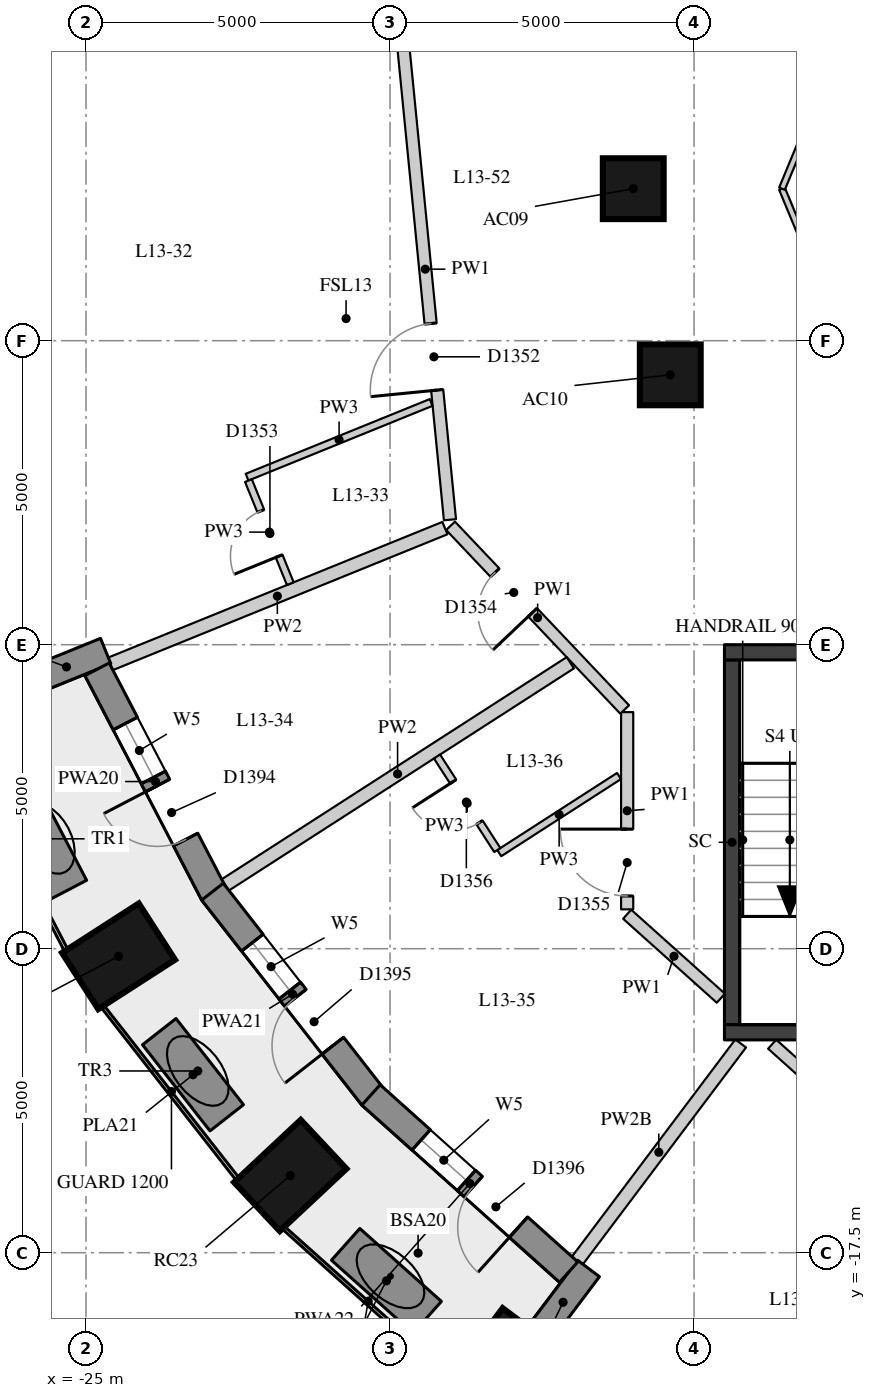
"""IFC4 building model, lengths in metres.
Left out: names, types, materials, properties, quantities, classifications, styles, units other than length and angle.
Written with IfcOpenShell. Run it as: python <this file> out.ifc"""

import sys

from ifc_helpers import new_model, si_unit, direction, frame, frame_2d, origin, origin_2d, place, context, subcontext, project, spatial, rectangle, extrude, element, fill, save


model = new_model("IFC4")
c1 = context("Model", 3, precision=1e-05, world=origin(), true_north=direction((0.0, 1.0)))
c2 = subcontext(c1, "Body", "Model", "MODEL_VIEW")
j1 = project(units=[si_unit("LENGTHUNIT", "METRE"), si_unit("PLANEANGLEUNIT", "RADIAN")], contexts=[c1])
p1 = place(None, origin())
s1 = spatial("IfcSite", under=j1, at=p1, CompositionType="ELEMENT")
p2 = place(p1, origin())
s2 = spatial("IfcBuilding", under=s1, at=p2, CompositionType="ELEMENT")
p3 = place(p2, frame((0.0, 0.0, 51.4)))
s3 = spatial("IfcBuildingStorey", under=s2, at=p3, CompositionType="ELEMENT", Elevation=51.4)
for number, where, z_axis, x_axis in (
    (1, (-24.465, -12.625, 0.0), (0.0, 0.0, 1.0), (-0.841, -0.541, 0.0)),
    (2, (-21.641, -16.23, 0.0), (0.0, 0.0, 1.0), (-0.73, -0.683, 0.0)),
    (3, (-18.159, -19.343, 0.0), (0.0, 0.0, 1.0), (-0.601, -0.799, 0.0)),
):
    element("IfcColumn", number, at=place(p3, frame(where, z_axis=z_axis, x_axis=x_axis)), inside=s3, PredefinedType="COLUMN", context=c2, shape_type="SweptSolid", body=[
        extrude(rectangle(XDim=1.5, YDim=1.1, at=origin_2d()), origin(), (0.0, 0.0, 1.0), 3.3),
    ])
for number, where, z_axis, x_axis in (
    (4, (-16.0, 0.0, 0.0), (0.0, 0.0, 1.0), (1.0, 0.0, 0.0)),
    (5, (-15.391, -3.062, 0.0), (0.0, 0.0, 1.0), (1.0, 0.0, 0.0)),
):
    element("IfcColumn", number, at=place(p3, frame(where, z_axis=z_axis, x_axis=x_axis)), inside=s3, PredefinedType="COLUMN", context=c2, shape_type="SweptSolid", body=[
        extrude(rectangle(XDim=1.0, YDim=1.0, at=origin_2d()), origin(), (0.0, 0.0, 1.0), 3.3),
    ])
p4 = place(p3, frame((-25.965, -8.127, 0.0), z_axis=(0.0, 0.0, 1.0), x_axis=(0.926575599743, 0.376108572039, 0.0)))
e6 = element("IfcWall", 6, at=p4, inside=s3, PredefinedType="SOLIDWALL", context=c2, shape_type="SweptSolid", body=[
    extrude(rectangle(XDim=1.39, YDim=0.45, at=frame_2d((0.695, 0.0))), origin(), (0.0, 0.0, 1.0), 3.02),
])
p5 = place(p3, frame((-17.572, -18.871, 0.0), z_axis=(0.0, 0.0, 1.0), x_axis=(0.601262851241, 0.799051302306, 0.0)))
e7 = element("IfcWall", 7, at=p5, inside=s3, PredefinedType="SOLIDWALL", context=c2, shape_type="SweptSolid", body=[
    extrude(rectangle(XDim=1.391, YDim=0.45, at=frame_2d((0.696, 0.0))), origin(), (0.0, 0.0, 1.0), 2.57),
])
p6 = place(p3, frame((-24.818, -7.905, 0.0), z_axis=(0.0, 0.0, 1.0), x_axis=(0.461517123562, -0.887131300687, 0.0)))
e8 = element("IfcWall", 8, at=p6, inside=s3, PredefinedType="SOLIDWALL", context=c2, shape_type="SweptSolid", body=[
    extrude(rectangle(XDim=4.162, YDim=0.45, at=frame_2d((2.081, 0.0))), origin(), (0.0, 0.0, 1.0), 3.02),
])
p7 = place(p6, frame((1.006, 0.0, 0.4)))
e9 = element("IfcOpeningElement", 9, at=p7, cuts=e8, PredefinedType="OPENING", context=c2, shape_type="SweptSolid", body=[
    extrude(rectangle(XDim=1.0, YDim=1.75, at=frame_2d((0.5, 0.875))), frame((0.0, 0.235, 0.0), z_axis=(0.0, -1.0, 0.0), x_axis=(1.0, 0.0, 0.0)), (0.0, 0.0, 1.0), 0.47),
])
p8 = place(p6, frame((2.156, 0.0, 0.0)))
e10 = element("IfcOpeningElement", 10, at=p8, cuts=e8, PredefinedType="OPENING", context=c2, shape_type="SweptSolid", body=[
    extrude(rectangle(XDim=1.0, YDim=2.15, at=frame_2d((0.5, 1.075))), frame((0.0, 0.235, 0.0), z_axis=(0.0, -1.0, 0.0), x_axis=(1.0, 0.0, 0.0)), (0.0, 0.0, 1.0), 0.47),
])
p9 = place(p3, frame((-22.92, -11.562, 0.0), z_axis=(0.0, 0.0, 1.0), x_axis=(0.615586464456, -0.788069352772, 0.0)))
e11 = element("IfcWall", 11, at=p9, inside=s3, PredefinedType="SOLIDWALL", context=c2, shape_type="SweptSolid", body=[
    extrude(rectangle(XDim=4.279, YDim=0.45, at=frame_2d((2.139, 0.0))), origin(), (0.0, 0.0, 1.0), 3.02),
])
p10 = place(p9, frame((1.064, 0.0, 0.4)))
e12 = element("IfcOpeningElement", 12, at=p10, cuts=e11, PredefinedType="OPENING", context=c2, shape_type="SweptSolid", body=[
    extrude(rectangle(XDim=1.0, YDim=1.75, at=frame_2d((0.5, 0.875))), frame((0.0, 0.235, 0.0), z_axis=(0.0, -1.0, 0.0), x_axis=(1.0, 0.0, 0.0)), (0.0, 0.0, 1.0), 0.47),
])
p11 = place(p9, frame((2.214, 0.0, 0.0)))
e13 = element("IfcOpeningElement", 13, at=p11, cuts=e11, PredefinedType="OPENING", context=c2, shape_type="SweptSolid", body=[
    extrude(rectangle(XDim=1.0, YDim=2.15, at=frame_2d((0.5, 1.075))), frame((0.0, 0.235, 0.0), z_axis=(0.0, -1.0, 0.0), x_axis=(1.0, 0.0, 0.0)), (0.0, 0.0, 1.0), 0.47),
])
p12 = place(p3, frame((-20.313, -14.905, 0.0), z_axis=(0.0, 0.0, 1.0), x_axis=(0.744616407434, -0.667492626012, 0.0)))
e14 = element("IfcWall", 14, at=p12, inside=s3, PredefinedType="SOLIDWALL", context=c2, shape_type="SweptSolid", body=[
    extrude(rectangle(XDim=4.365, YDim=0.45, at=frame_2d((2.183, 0.0))), origin(), (0.0, 0.0, 1.0), 3.02),
])
p13 = place(p12, frame((1.108, 0.0, 0.4)))
e15 = element("IfcOpeningElement", 15, at=p13, cuts=e14, PredefinedType="OPENING", context=c2, shape_type="SweptSolid", body=[
    extrude(rectangle(XDim=1.0, YDim=1.75, at=frame_2d((0.5, 0.875))), frame((0.0, 0.235, 0.0), z_axis=(0.0, -1.0, 0.0), x_axis=(1.0, 0.0, 0.0)), (0.0, 0.0, 1.0), 0.47),
])
p14 = place(p12, frame((2.258, 0.0, 0.0)))
e16 = element("IfcOpeningElement", 16, at=p14, cuts=e14, PredefinedType="OPENING", context=c2, shape_type="SweptSolid", body=[
    extrude(rectangle(XDim=1.0, YDim=2.15, at=frame_2d((0.5, 1.075))), frame((0.0, 0.235, 0.0), z_axis=(0.0, -1.0, 0.0), x_axis=(1.0, 0.0, 0.0)), (0.0, 0.0, 1.0), 0.47),
])
p15 = place(p3, frame((-26.133, -9.941, 0.0), z_axis=(0.0, 0.0, 1.0), x_axis=(0.462501112253, -0.886618701114, 0.0)))
e17 = element("IfcWall", 17, at=p15, inside=s3, PredefinedType="USERDEFINED", context=c2, shape_type="SweptSolid", body=[
    extrude(rectangle(XDim=1.8, YDim=0.7, at=frame_2d((0.9, 0.0))), origin(), (0.0, 0.0, 1.0), 0.75),
])
p16 = place(p3, frame((-23.795, -13.864, 0.0), z_axis=(0.0, 0.0, 1.0), x_axis=(0.616622746332, -0.787258781282, 0.0)))
e18 = element("IfcWall", 18, at=p16, inside=s3, PredefinedType="USERDEFINED", context=c2, shape_type="SweptSolid", body=[
    extrude(rectangle(XDim=1.8, YDim=0.7, at=frame_2d((0.9, 0.0))), origin(), (0.0, 0.0, 1.0), 0.75),
])
p17 = place(p3, frame((-20.73, -17.363, 0.0), z_axis=(0.0, 0.0, 1.0), x_axis=(0.745535653445, -0.666465745139, 0.0)))
e19 = element("IfcWall", 19, at=p17, inside=s3, PredefinedType="USERDEFINED", context=c2, shape_type="SweptSolid", body=[
    extrude(rectangle(XDim=1.8, YDim=0.7, at=frame_2d((0.9, 0.0))), origin(), (0.0, 0.0, 1.0), 0.75),
])
p18 = place(p3, frame((-14.375, -13.75, -0.28), z_axis=(0.0, 0.0, 1.0), x_axis=(0.0, 1.0, 0.0)))
e20 = element("IfcWall", 20, at=p18, inside=s3, PredefinedType="SHEAR", context=c2, shape_type="SweptSolid", body=[
    extrude(rectangle(XDim=6.0, YDim=0.25, at=frame_2d((3.0, 0.0))), origin(), (0.0, 0.0, 1.0), 3.3),
])
for number, where, z_axis, x_axis in (
    (21, (-14.5, -7.625, -0.28), (0.0, 0.0, 1.0), (1.0, 0.0, 0.0)),
    (22, (-14.5, -13.875, -0.28), (0.0, 0.0, 1.0), (1.0, 0.0, 0.0)),
):
    element("IfcWall", number, at=place(p3, frame(where, z_axis=z_axis, x_axis=x_axis)), inside=s3, PredefinedType="SHEAR", context=c2, shape_type="SweptSolid", body=[
        extrude(rectangle(XDim=5.2, YDim=0.25, at=frame_2d((2.6, 0.0))), origin(), (0.0, 0.0, 1.0), 3.3),
    ])
p19 = place(p3, frame((-14.559, -13.314, 0.0), z_axis=(0.0, 0.0, 1.0), x_axis=(-0.744636171002, 0.667470578254, 0.0)))
e23 = element("IfcWall", 23, at=p19, inside=s3, PredefinedType="PARTITIONING", context=c2, shape_type="SweptSolid", body=[
    extrude(rectangle(XDim=2.069, YDim=0.2, at=frame_2d((1.035, 0.0))), origin(), (0.0, 0.0, 1.0), 3.02),
])
p20 = place(p3, frame((-16.1, -11.853, 0.0), z_axis=(0.0, 0.0, 1.0), x_axis=(0.0, 1.0, 0.0)))
e24 = element("IfcWall", 24, at=p20, inside=s3, PredefinedType="PARTITIONING", context=c2, shape_type="SweptSolid", body=[
    extrude(rectangle(XDim=3.244, YDim=0.2, at=frame_2d((1.622, 0.0))), origin(), (0.0, 0.0, 1.0), 3.02),
])
p21 = place(p20, frame((0.22, 0.0, 0.0)))
e25 = element("IfcOpeningElement", 25, at=p21, cuts=e24, PredefinedType="OPENING", context=c2, shape_type="SweptSolid", body=[
    extrude(rectangle(XDim=1.1, YDim=2.1, at=frame_2d((0.55, 1.05))), frame((0.0, 0.11, 0.0), z_axis=(0.0, -1.0, 0.0), x_axis=(1.0, 0.0, 0.0)), (0.0, 0.0, 1.0), 0.22),
])
p22 = place(p3, frame((-16.141, -8.566, 0.0), z_axis=(0.0, 0.0, 1.0), x_axis=(-0.687938220375, 0.725769250483, 0.0)))
e26 = element("IfcWall", 26, at=p22, inside=s3, PredefinedType="PARTITIONING", context=c2, shape_type="SweptSolid", body=[
    extrude(rectangle(XDim=4.162, YDim=0.2, at=frame_2d((2.081, 0.0))), origin(), (0.0, 0.0, 1.0), 3.02),
])
p23 = place(p22, frame((2.201, 0.0, 0.0)))
e27 = element("IfcOpeningElement", 27, at=p23, cuts=e26, PredefinedType="OPENING", context=c2, shape_type="SweptSolid", body=[
    extrude(rectangle(XDim=0.9, YDim=2.1, at=frame_2d((0.45, 1.05))), frame((0.0, 0.11, 0.0), z_axis=(0.0, -1.0, 0.0), x_axis=(1.0, 0.0, 0.0)), (0.0, 0.0, 1.0), 0.22),
])
p24 = place(p3, frame((-19.014, -5.445, 0.0), z_axis=(0.0, 0.0, 1.0), x_axis=(-0.098076369896, 0.995178891289, 0.0)))
e28 = element("IfcWall", 28, at=p24, inside=s3, PredefinedType="PARTITIONING", context=c2, shape_type="SweptSolid", body=[
    extrude(rectangle(XDim=8.282, YDim=0.2, at=frame_2d((4.141, 0.0))), origin(), (0.0, 0.0, 1.0), 3.02),
])
p25 = place(p24, frame((2.142, 0.0, 0.0)))
e29 = element("IfcOpeningElement", 29, at=p25, cuts=e28, PredefinedType="OPENING", context=c2, shape_type="SweptSolid", body=[
    extrude(rectangle(XDim=1.1, YDim=2.1, at=frame_2d((0.55, 1.05))), frame((0.0, 0.11, 0.0), z_axis=(0.0, -1.0, 0.0), x_axis=(1.0, 0.0, 0.0)), (0.0, 0.0, 1.0), 0.22),
])
p26 = place(p3, frame((-12.054, -15.56, 0.0), z_axis=(0.0, 0.0, 1.0), x_axis=(-0.744625700487, 0.66748225907, 0.0)))
e30 = element("IfcWall", 30, at=p26, inside=s3, PredefinedType="PARTITIONING", context=c2, shape_type="SweptSolid", body=[
    extrude(rectangle(XDim=2.231, YDim=0.2, at=frame_2d((1.116, 0.0))), origin(), (0.0, 0.0, 1.0), 3.02),
])
p27 = place(p3, frame((-24.609, -7.82, 0.0), z_axis=(0.0, 0.0, 1.0), x_axis=(0.926562262773, 0.376141427131, 0.0)))
e31 = element("IfcWall", 31, at=p27, inside=s3, PredefinedType="PARTITIONING", context=c2, shape_type="SweptSolid", body=[
    extrude(rectangle(XDim=5.948, YDim=0.22, at=frame_2d((2.974, 0.0))), origin(), (0.0, 0.0, 1.0), 3.02),
])
p28 = place(p3, frame((-22.717, -11.456, 0.0), z_axis=(0.0, 0.0, 1.0), x_axis=(0.840775666807, 0.541383669965, 0.0)))
e32 = element("IfcWall", 32, at=p28, inside=s3, PredefinedType="PARTITIONING", context=c2, shape_type="SweptSolid", body=[
    extrude(rectangle(XDim=6.759, YDim=0.22, at=frame_2d((3.379, 0.0))), origin(), (0.0, 0.0, 1.0), 3.02),
])
p29 = place(p3, frame((-16.927, -17.638, 0.0), z_axis=(0.0, 0.0, 1.0), x_axis=(0.601158965663, 0.799129462605, 0.0)))
e33 = element("IfcWall", 33, at=p29, inside=s3, PredefinedType="PARTITIONING", context=c2, shape_type="SweptSolid", body=[
    extrude(rectangle(XDim=4.48, YDim=0.22, at=frame_2d((2.24, 0.0))), origin(), (0.0, 0.0, 1.0), 2.57),
])
p30 = place(p3, frame((-19.324, -3.516, 0.0), z_axis=(0.0, 0.0, 1.0), x_axis=(-0.926573216048, -0.376114444421, 0.0)))
e34 = element("IfcWall", 34, at=p30, inside=s3, PredefinedType="PARTITIONING", context=c2, shape_type="SweptSolid", body=[
    extrude(rectangle(XDim=3.267, YDim=0.12, at=frame_2d((1.634, 0.0))), origin(), (0.0, 0.0, 1.0), 3.02),
])
p31 = place(p3, frame((-16.234, -9.66, 0.0), z_axis=(0.0, 0.0, 1.0), x_axis=(-0.840731269954, -0.541452612628, 0.0)))
e35 = element("IfcWall", 35, at=p31, inside=s3, PredefinedType="PARTITIONING", context=c2, shape_type="SweptSolid", body=[
    extrude(rectangle(XDim=2.343, YDim=0.12, at=frame_2d((1.171, 0.0))), origin(), (0.0, 0.0, 1.0), 3.02),
])
p32 = place(p3, frame((-22.329, -4.801, 0.0), z_axis=(0.0, 0.0, 1.0), x_axis=(0.376101474088, -0.926578480858, 0.0)))
e36 = element("IfcWall", 36, at=p32, inside=s3, PredefinedType="PARTITIONING", context=c2, shape_type="SweptSolid", body=[
    extrude(rectangle(XDim=1.83, YDim=0.12, at=frame_2d((0.915, 0.0))), origin(), (0.0, 0.0, 1.0), 3.02),
])
p33 = place(p32, frame((0.54, 0.0, 0.0)))
e37 = element("IfcOpeningElement", 37, at=p33, cuts=e36, PredefinedType="OPENING", context=c2, shape_type="SweptSolid", body=[
    extrude(rectangle(XDim=0.8, YDim=2.1, at=frame_2d((0.4, 1.05))), frame((0.0, 0.07, 0.0), z_axis=(0.0, -1.0, 0.0), x_axis=(1.0, 0.0, 0.0)), (0.0, 0.0, 1.0), 0.14),
])
p34 = place(p3, frame((-18.236, -10.878, 0.0), z_axis=(0.0, 0.0, 1.0), x_axis=(-0.54164058606, 0.840610180484, 0.0)))
e38 = element("IfcWall", 38, at=p34, inside=s3, PredefinedType="PARTITIONING", context=c2, shape_type="SweptSolid", body=[
    extrude(rectangle(XDim=1.83, YDim=0.12, at=frame_2d((0.915, 0.0))), origin(), (0.0, 0.0, 1.0), 3.02),
])
p35 = place(p34, frame((0.54, 0.0, 0.0)))
e39 = element("IfcOpeningElement", 39, at=p35, cuts=e38, PredefinedType="OPENING", context=c2, shape_type="SweptSolid", body=[
    extrude(rectangle(XDim=0.8, YDim=2.1, at=frame_2d((0.4, 1.05))), frame((0.0, 0.07, 0.0), z_axis=(0.0, -1.0, 0.0), x_axis=(1.0, 0.0, 0.0)), (0.0, 0.0, 1.0), 0.14),
])
for number, where, z_axis, x_axis in (
    (40, (-11.927, -3.927, 0.0), (0.0, 0.0, 1.0), (-0.383, 0.924, 0.0)),
    (41, (-13.554, 0.0, 0.0), (0.0, 0.0, 1.0), (0.383, 0.924, 0.0)),
):
    element("IfcWall", number, at=place(p3, frame(where, z_axis=z_axis, x_axis=x_axis)), inside=s3, PredefinedType="PARTITIONING", context=c2, shape_type="SweptSolid", body=[
        extrude(rectangle(XDim=4.251, YDim=0.1, at=frame_2d((2.125, 0.0))), origin(), (0.0, 0.0, 1.0), 3.02),
    ])
p36 = place(p7, origin())
e42 = element("IfcWindow", 42, at=p36, inside=s3, PartitioningType="SINGLE_PANEL", PredefinedType="WINDOW", context=c2, shape_type="SweptSolid", body=[
    extrude(rectangle(XDim=1.0, YDim=1.75, at=frame_2d((0.5, 0.875))), frame((0.0, 0.035, 0.0), z_axis=(0.0, -1.0, 0.0), x_axis=(1.0, 0.0, 0.0)), (0.0, 0.0, 1.0), 0.06),
])
fill(e9, e42)
p37 = place(p8, frame((1.0, 0.0, 0.0), z_axis=(0.0, 0.0, 1.0), x_axis=(-1.0, 0.0, 0.0)))
e43 = element("IfcDoor", 43, at=p37, inside=s3, OperationType="SINGLE_SWING_RIGHT", PredefinedType="DOOR", context=c2, shape_type="SweptSolid", body=[
    extrude(rectangle(XDim=1.0, YDim=2.15, at=frame_2d((0.5, 1.075))), frame((0.0, 0.075, 0.0), z_axis=(0.0, -1.0, 0.0), x_axis=(1.0, 0.0, 0.0)), (0.0, 0.0, 1.0), 0.05),
])
fill(e10, e43)
p38 = place(p10, origin())
e44 = element("IfcWindow", 44, at=p38, inside=s3, PartitioningType="SINGLE_PANEL", PredefinedType="WINDOW", context=c2, shape_type="SweptSolid", body=[
    extrude(rectangle(XDim=1.0, YDim=1.75, at=frame_2d((0.5, 0.875))), frame((0.0, 0.035, 0.0), z_axis=(0.0, -1.0, 0.0), x_axis=(1.0, 0.0, 0.0)), (0.0, 0.0, 1.0), 0.06),
])
fill(e12, e44)
p39 = place(p11, frame((1.0, 0.0, 0.0), z_axis=(0.0, 0.0, 1.0), x_axis=(-1.0, 0.0, 0.0)))
e45 = element("IfcDoor", 45, at=p39, inside=s3, OperationType="SINGLE_SWING_LEFT", PredefinedType="DOOR", context=c2, shape_type="SweptSolid", body=[
    extrude(rectangle(XDim=1.0, YDim=2.15, at=frame_2d((0.5, 1.075))), frame((0.0, 0.075, 0.0), z_axis=(0.0, -1.0, 0.0), x_axis=(1.0, 0.0, 0.0)), (0.0, 0.0, 1.0), 0.05),
])
fill(e13, e45)
p40 = place(p13, origin())
e46 = element("IfcWindow", 46, at=p40, inside=s3, PartitioningType="SINGLE_PANEL", PredefinedType="WINDOW", context=c2, shape_type="SweptSolid", body=[
    extrude(rectangle(XDim=1.0, YDim=1.75, at=frame_2d((0.5, 0.875))), frame((0.0, 0.035, 0.0), z_axis=(0.0, -1.0, 0.0), x_axis=(1.0, 0.0, 0.0)), (0.0, 0.0, 1.0), 0.06),
])
fill(e15, e46)
p41 = place(p14, frame((1.0, 0.0, 0.0), z_axis=(0.0, 0.0, 1.0), x_axis=(-1.0, 0.0, 0.0)))
e47 = element("IfcDoor", 47, at=p41, inside=s3, OperationType="SINGLE_SWING_LEFT", PredefinedType="DOOR", context=c2, shape_type="SweptSolid", body=[
    extrude(rectangle(XDim=1.0, YDim=2.15, at=frame_2d((0.5, 1.075))), frame((0.0, 0.075, 0.0), z_axis=(0.0, -1.0, 0.0), x_axis=(1.0, 0.0, 0.0)), (0.0, 0.0, 1.0), 0.05),
])
fill(e16, e47)
p42 = place(p25, origin())
e48 = element("IfcDoor", 48, at=p42, inside=s3, OperationType="SINGLE_SWING_LEFT", PredefinedType="DOOR", context=c2, shape_type="SweptSolid", body=[
    extrude(rectangle(XDim=1.1, YDim=2.1, at=frame_2d((0.55, 1.05))), frame((0.0, 0.025, 0.0), z_axis=(0.0, -1.0, 0.0), x_axis=(1.0, 0.0, 0.0)), (0.0, 0.0, 1.0), 0.05),
])
fill(e29, e48)
p43 = place(p33, origin())
e49 = element("IfcDoor", 49, at=p43, inside=s3, OperationType="SINGLE_SWING_LEFT", PredefinedType="DOOR", context=c2, shape_type="SweptSolid", body=[
    extrude(rectangle(XDim=0.8, YDim=2.1, at=frame_2d((0.4, 1.05))), frame((0.0, 0.025, 0.0), z_axis=(0.0, -1.0, 0.0), x_axis=(1.0, 0.0, 0.0)), (0.0, 0.0, 1.0), 0.05),
])
fill(e37, e49)
p44 = place(p23, origin())
e50 = element("IfcDoor", 50, at=p44, inside=s3, OperationType="SINGLE_SWING_LEFT", PredefinedType="DOOR", context=c2, shape_type="SweptSolid", body=[
    extrude(rectangle(XDim=0.9, YDim=2.1, at=frame_2d((0.45, 1.05))), frame((0.0, 0.025, 0.0), z_axis=(0.0, -1.0, 0.0), x_axis=(1.0, 0.0, 0.0)), (0.0, 0.0, 1.0), 0.05),
])
fill(e27, e50)
p45 = place(p21, origin())
e51 = element("IfcDoor", 51, at=p45, inside=s3, OperationType="SINGLE_SWING_RIGHT", PredefinedType="DOOR", context=c2, shape_type="SweptSolid", body=[
    extrude(rectangle(XDim=1.1, YDim=2.1, at=frame_2d((0.55, 1.05))), frame((0.0, 0.025, 0.0), z_axis=(0.0, -1.0, 0.0), x_axis=(1.0, 0.0, 0.0)), (0.0, 0.0, 1.0), 0.05),
])
fill(e25, e51)
p46 = place(p35, origin())
e52 = element("IfcDoor", 52, at=p46, inside=s3, OperationType="SINGLE_SWING_RIGHT", PredefinedType="DOOR", context=c2, shape_type="SweptSolid", body=[
    extrude(rectangle(XDim=0.8, YDim=2.1, at=frame_2d((0.4, 1.05))), frame((0.0, 0.025, 0.0), z_axis=(0.0, -1.0, 0.0), x_axis=(1.0, 0.0, 0.0)), (0.0, 0.0, 1.0), 0.05),
])
fill(e39, e52)
save(model, sys.argv[1])
